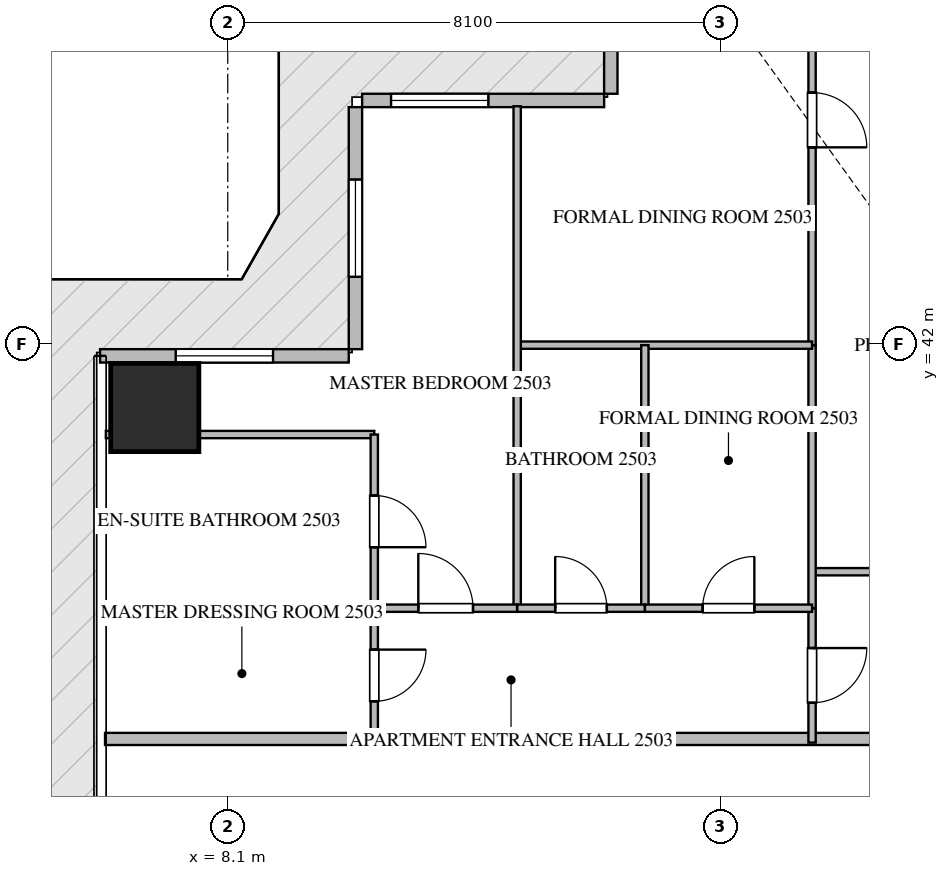
"""IFC4 building model, lengths in metres.
Left out: names, types, materials, properties, quantities, classifications, styles, units other than length and angle.
Written with IfcOpenShell. Run it as: python <this file> out.ifc"""

import sys

from ifc_helpers import new_model, si_unit, direction, frame, frame_2d, origin, origin_2d, place, context, subcontext, project, spatial, rectangle, extrude, source, transform, mapped, element, fill, save


model = new_model("IFC4")
c1 = context("Model", 3, precision=1e-05, world=origin(), true_north=direction((0.0, 1.0)))
c2 = subcontext(c1, "Body", "Model", "MODEL_VIEW")
j1 = project(units=[si_unit("LENGTHUNIT", "METRE"), si_unit("PLANEANGLEUNIT", "RADIAN")], contexts=[c1])
p1 = place(None, origin())
s1 = spatial("IfcSite", under=j1, at=p1, CompositionType="ELEMENT")
p2 = place(p1, origin())
s2 = spatial("IfcBuilding", under=s1, at=p2, CompositionType="ELEMENT")
p3 = place(p2, frame((0.0, 0.0, 101.7)))
s3 = spatial("IfcBuildingStorey", under=s2, at=p3, CompositionType="ELEMENT", Elevation=101.7)
m1 = source(origin(), c2, "Body", "SweptSolid", [
    extrude(rectangle(XDim=1.45, YDim=1.45, at=origin_2d()), origin(), (0.0, 0.0, 1.0), 3.75),
])
p4 = place(p3, frame((6.9, 40.95, -0.26), z_axis=(0.0, 0.0, 1.0), x_axis=(1.0, 0.0, 0.0)))
e1 = element("IfcColumn", 1, at=p4, inside=s3, PredefinedType="COLUMN", context=c2, shape_type="MappedRepresentation", body=[
    mapped(m1, transform((0.0, 0.0, 0.0), scale=1.0)),
])
p5 = place(p3, frame((14.4, 50.2, 0.0), z_axis=(0.0, 0.0, 1.0), x_axis=(0.0, -1.0, 0.0)))
e2 = element("IfcWall", 2, at=p5, inside=s3, PredefinedType="ELEMENTEDWALL", context=c2, shape_type="SweptSolid", body=[
    extrude(rectangle(XDim=4.09, YDim=0.22, at=frame_2d((2.045, 0.0))), origin(), (0.0, 0.0, 1.0), 3.475),
])
p6 = place(p5, frame((1.245, 0.0, 0.65)))
e3 = element("IfcOpeningElement", 3, at=p6, cuts=e2, PredefinedType="OPENING", context=c2, shape_type="SweptSolid", body=[
    extrude(rectangle(XDim=1.6, YDim=2.1, at=frame_2d((0.8, 1.05))), frame((0.0, 0.12, 0.0), z_axis=(0.0, -1.0, 0.0), x_axis=(1.0, 0.0, 0.0)), (0.0, 0.0, 1.0), 0.24),
])
p7 = place(p3, frame((14.29, 46.0, 0.0), z_axis=(0.0, 0.0, 1.0), x_axis=(-1.0, 0.0, 0.0)))
e4 = element("IfcWall", 4, at=p7, inside=s3, PredefinedType="ELEMENTEDWALL", context=c2, shape_type="SweptSolid", body=[
    extrude(rectangle(XDim=3.98, YDim=0.22, at=frame_2d((1.99, 0.0))), origin(), (0.0, 0.0, 1.0), 3.475),
])
p8 = place(p7, frame((1.904, 0.0, 0.65)))
e5 = element("IfcOpeningElement", 5, at=p8, cuts=e4, PredefinedType="OPENING", context=c2, shape_type="SweptSolid", body=[
    extrude(rectangle(XDim=1.6, YDim=2.1, at=frame_2d((0.8, 1.05))), frame((0.0, 0.12, 0.0), z_axis=(0.0, -1.0, 0.0), x_axis=(1.0, 0.0, 0.0)), (0.0, 0.0, 1.0), 0.24),
])
p9 = place(p3, frame((10.2, 45.89, 0.0), z_axis=(0.0, 0.0, 1.0), x_axis=(0.0, -1.0, 0.0)))
e6 = element("IfcWall", 6, at=p9, inside=s3, PredefinedType="ELEMENTEDWALL", context=c2, shape_type="SweptSolid", body=[
    extrude(rectangle(XDim=3.98, YDim=0.22, at=frame_2d((1.99, 0.0))), origin(), (0.0, 0.0, 1.0), 3.475),
])
p10 = place(p9, frame((1.19, 0.0, 0.65)))
e7 = element("IfcOpeningElement", 7, at=p10, cuts=e6, PredefinedType="OPENING", context=c2, shape_type="SweptSolid", body=[
    extrude(rectangle(XDim=1.6, YDim=2.1, at=frame_2d((0.8, 1.05))), frame((0.0, 0.12, 0.0), z_axis=(0.0, -1.0, 0.0), x_axis=(1.0, 0.0, 0.0)), (0.0, 0.0, 1.0), 0.24),
])
p11 = place(p3, frame((10.09, 41.8, 0.0), z_axis=(0.0, 0.0, 1.0), x_axis=(-1.0, 0.0, 0.0)))
e8 = element("IfcWall", 8, at=p11, inside=s3, PredefinedType="ELEMENTEDWALL", context=c2, shape_type="SweptSolid", body=[
    extrude(rectangle(XDim=4.09, YDim=0.22, at=frame_2d((2.045, 0.0))), origin(), (0.0, 0.0, 1.0), 3.475),
])
p12 = place(p11, frame((1.245, 0.0, 0.65)))
e9 = element("IfcOpeningElement", 9, at=p12, cuts=e8, PredefinedType="OPENING", context=c2, shape_type="SweptSolid", body=[
    extrude(rectangle(XDim=1.6, YDim=2.1, at=frame_2d((0.8, 1.05))), frame((0.0, 0.12, 0.0), z_axis=(0.0, -1.0, 0.0), x_axis=(1.0, 0.0, 0.0)), (0.0, 0.0, 1.0), 0.24),
])
p13 = place(p3, frame((6.082, 35.5, 0.0), z_axis=(0.0, 0.0, 1.0), x_axis=(1.0, 0.0, 0.0)))
e10 = element("IfcWall", 10, at=p13, inside=s3, PredefinedType="PARTITIONING", context=c2, shape_type="SweptSolid", body=[
    extrude(rectangle(XDim=15.318, YDim=0.2, at=frame_2d((7.659, 0.0))), origin(), (0.0, 0.0, 1.0), 3.49),
])
p14 = place(p3, frame((17.71, 38.25, 0.0), z_axis=(0.0, 0.0, 1.0), x_axis=(1.0, 0.0, 0.0)))
e11 = element("IfcWall", 11, at=p14, inside=s3, PredefinedType="PARTITIONING", context=c2, shape_type="SweptSolid", body=[
    extrude(rectangle(XDim=2.85, YDim=0.12, at=frame_2d((1.425, 0.0))), origin(), (0.0, 0.0, 1.0), 3.49),
])
p15 = place(p14, frame((1.0, 0.0, 0.0)))
e12 = element("IfcOpeningElement", 12, at=p15, cuts=e11, PredefinedType="OPENING", context=c2, shape_type="SweptSolid", body=[
    extrude(rectangle(XDim=0.85, YDim=2.1, at=frame_2d((0.425, 1.05))), frame((0.0, 0.07, 0.0), z_axis=(0.0, -1.0, 0.0), x_axis=(1.0, 0.0, 0.0)), (0.0, 0.0, 1.0), 0.14),
])
p16 = place(p3, frame((17.71, 37.65, 0.0), z_axis=(0.0, 0.0, 1.0), x_axis=(0.0, -1.0, 0.0)))
e13 = element("IfcWall", 13, at=p16, inside=s3, PredefinedType="PARTITIONING", context=c2, shape_type="SweptSolid", body=[
    extrude(rectangle(XDim=2.21, YDim=0.12, at=frame_2d((1.105, 0.0))), origin(), (0.0, 0.0, 1.0), 3.49),
])
p17 = place(p16, frame((0.655, 0.0, 0.0)))
e14 = element("IfcOpeningElement", 14, at=p17, cuts=e13, PredefinedType="OPENING", context=c2, shape_type="SweptSolid", body=[
    extrude(rectangle(XDim=0.9, YDim=2.1, at=frame_2d((0.45, 1.05))), frame((0.0, 0.07, 0.0), z_axis=(0.0, -1.0, 0.0), x_axis=(1.0, 0.0, 0.0)), (0.0, 0.0, 1.0), 0.14),
])
p18 = place(p3, frame((17.71, 50.105, 0.0), z_axis=(0.0, 0.0, 1.0), x_axis=(0.0, -1.0, 0.0)))
e15 = element("IfcWall", 15, at=p18, inside=s3, PredefinedType="PARTITIONING", context=c2, shape_type="SweptSolid", body=[
    extrude(rectangle(XDim=8.129, YDim=0.12, at=frame_2d((4.064, 0.0))), origin(), (0.0, 0.0, 1.0), 3.49),
])
p19 = place(p18, frame((3.976, 0.0, 0.0)))
e16 = element("IfcOpeningElement", 16, at=p19, cuts=e15, PredefinedType="OPENING", context=c2, shape_type="SweptSolid", body=[
    extrude(rectangle(XDim=0.9, YDim=2.1, at=frame_2d((0.45, 1.05))), frame((0.0, 0.07, 0.0), z_axis=(0.0, -1.0, 0.0), x_axis=(1.0, 0.0, 0.0)), (0.0, 0.0, 1.0), 0.14),
])
p20 = place(p3, frame((17.71, 41.974, 0.0), z_axis=(0.0, 0.0, 1.0), x_axis=(0.0, -1.0, 0.0)))
e17 = element("IfcWall", 17, at=p20, inside=s3, PredefinedType="PARTITIONING", context=c2, shape_type="SweptSolid", body=[
    extrude(rectangle(XDim=4.322, YDim=0.12, at=frame_2d((2.161, 0.0))), origin(), (0.0, 0.0, 1.0), 3.49),
])
p21 = place(p3, frame((12.86, 41.976, 0.0), z_axis=(0.0, 0.0, 1.0), x_axis=(1.0, 0.0, 0.0)))
e18 = element("IfcWall", 18, at=p21, inside=s3, PredefinedType="PARTITIONING", context=c2, shape_type="SweptSolid", body=[
    extrude(rectangle(XDim=4.85, YDim=0.12, at=frame_2d((2.425, 0.0))), origin(), (0.0, 0.0, 1.0), 3.49),
])
p22 = place(p3, frame((12.86, 45.905, 0.0), z_axis=(0.0, 0.0, 1.0), x_axis=(0.0, -1.0, 0.0)))
e19 = element("IfcWall", 19, at=p22, inside=s3, PredefinedType="PARTITIONING", context=c2, shape_type="SweptSolid", body=[
    extrude(rectangle(XDim=8.255, YDim=0.12, at=frame_2d((4.127, 0.0))), origin(), (0.0, 0.0, 1.0), 3.49),
])
p23 = place(p3, frame((14.96, 41.976, 0.0), z_axis=(0.0, 0.0, 1.0), x_axis=(0.0, -1.0, 0.0)))
e20 = element("IfcWall", 20, at=p23, inside=s3, PredefinedType="PARTITIONING", context=c2, shape_type="SweptSolid", body=[
    extrude(rectangle(XDim=4.326, YDim=0.12, at=frame_2d((2.163, 0.0))), origin(), (0.0, 0.0, 1.0), 3.49),
])
p24 = place(p3, frame((12.86, 37.65, 0.0), z_axis=(0.0, 0.0, 1.0), x_axis=(1.0, 0.0, 0.0)))
e21 = element("IfcWall", 21, at=p24, inside=s3, PredefinedType="PARTITIONING", context=c2, shape_type="SweptSolid", body=[
    extrude(rectangle(XDim=2.1, YDim=0.12, at=frame_2d((1.05, 0.0))), origin(), (0.0, 0.0, 1.0), 3.49),
])
p25 = place(p24, frame((0.625, 0.0, 0.0)))
e22 = element("IfcOpeningElement", 22, at=p25, cuts=e21, PredefinedType="OPENING", context=c2, shape_type="SweptSolid", body=[
    extrude(rectangle(XDim=0.85, YDim=2.1, at=frame_2d((0.425, 1.05))), frame((0.0, 0.07, 0.0), z_axis=(0.0, -1.0, 0.0), x_axis=(1.0, 0.0, 0.0)), (0.0, 0.0, 1.0), 0.14),
])
p26 = place(p3, frame((14.962, 37.65, 0.0), z_axis=(0.0, 0.0, 1.0), x_axis=(1.0, 0.0, 0.0)))
e23 = element("IfcWall", 23, at=p26, inside=s3, PredefinedType="PARTITIONING", context=c2, shape_type="SweptSolid", body=[
    extrude(rectangle(XDim=2.748, YDim=0.12, at=frame_2d((1.374, 0.0))), origin(), (0.0, 0.0, 1.0), 3.49),
])
p27 = place(p26, frame((0.949, 0.0, 0.0)))
e24 = element("IfcOpeningElement", 24, at=p27, cuts=e23, PredefinedType="OPENING", context=c2, shape_type="SweptSolid", body=[
    extrude(rectangle(XDim=0.85, YDim=2.1, at=frame_2d((0.425, 1.05))), frame((0.0, 0.07, 0.0), z_axis=(0.0, -1.0, 0.0), x_axis=(1.0, 0.0, 0.0)), (0.0, 0.0, 1.0), 0.14),
])
p28 = place(p3, frame((10.51, 37.65, 0.0), z_axis=(0.0, 0.0, 1.0), x_axis=(1.0, 0.0, 0.0)))
e25 = element("IfcWall", 25, at=p28, inside=s3, PredefinedType="PARTITIONING", context=c2, shape_type="SweptSolid", body=[
    extrude(rectangle(XDim=2.348, YDim=0.12, at=frame_2d((1.174, 0.0))), origin(), (0.0, 0.0, 1.0), 3.49),
])
p29 = place(p28, frame((0.724, 0.0, 0.0)))
e26 = element("IfcOpeningElement", 26, at=p29, cuts=e25, PredefinedType="OPENING", context=c2, shape_type="SweptSolid", body=[
    extrude(rectangle(XDim=0.9, YDim=2.1, at=frame_2d((0.45, 1.05))), frame((0.0, 0.07, 0.0), z_axis=(0.0, -1.0, 0.0), x_axis=(1.0, 0.0, 0.0)), (0.0, 0.0, 1.0), 0.14),
])
p30 = place(p3, frame((6.095, 40.506, 0.0), z_axis=(0.0, 0.0, 1.0), x_axis=(1.0, 0.0, 0.0)))
e27 = element("IfcWall", 27, at=p30, inside=s3, PredefinedType="PARTITIONING", context=c2, shape_type="SweptSolid", body=[
    extrude(rectangle(XDim=4.415, YDim=0.12, at=frame_2d((2.208, 0.0))), origin(), (0.0, 0.0, 1.0), 3.49),
])
p31 = place(p3, frame((6.095, 37.65, 0.0), z_axis=(0.0, 0.0, 1.0), x_axis=(1.0, 0.0, 0.0)))
e28 = element("IfcWall", 28, at=p31, inside=s3, PredefinedType="PARTITIONING", context=c2, shape_type="SweptSolid", body=[
    extrude(rectangle(XDim=4.413, YDim=0.12, at=frame_2d((2.207, 0.0))), origin(), (0.0, 0.0, 1.0), 3.49),
])
p32 = place(p3, frame((10.51, 40.506, 0.0), z_axis=(0.0, 0.0, 1.0), x_axis=(0.0, -1.0, 0.0)))
e29 = element("IfcWall", 29, at=p32, inside=s3, PredefinedType="PARTITIONING", context=c2, shape_type="SweptSolid", body=[
    extrude(rectangle(XDim=2.856, YDim=0.12, at=frame_2d((1.428, 0.0))), origin(), (0.0, 0.0, 1.0), 3.49),
])
p33 = place(p32, frame((1.003, 0.0, 0.0)))
e30 = element("IfcOpeningElement", 30, at=p33, cuts=e29, PredefinedType="OPENING", context=c2, shape_type="SweptSolid", body=[
    extrude(rectangle(XDim=0.85, YDim=2.1, at=frame_2d((0.425, 1.05))), frame((0.0, 0.07, 0.0), z_axis=(0.0, -1.0, 0.0), x_axis=(1.0, 0.0, 0.0)), (0.0, 0.0, 1.0), 0.14),
])
p34 = place(p3, frame((10.51, 37.648, 0.0), z_axis=(0.0, 0.0, 1.0), x_axis=(0.0, -1.0, 0.0)))
e31 = element("IfcWall", 31, at=p34, inside=s3, PredefinedType="PARTITIONING", context=c2, shape_type="SweptSolid", body=[
    extrude(rectangle(XDim=2.208, YDim=0.12, at=frame_2d((1.104, 0.0))), origin(), (0.0, 0.0, 1.0), 3.49),
])
p35 = place(p34, frame((0.679, 0.0, 0.0)))
e32 = element("IfcOpeningElement", 32, at=p35, cuts=e31, PredefinedType="OPENING", context=c2, shape_type="SweptSolid", body=[
    extrude(rectangle(XDim=0.85, YDim=2.1, at=frame_2d((0.425, 1.05))), frame((0.0, 0.07, 0.0), z_axis=(0.0, -1.0, 0.0), x_axis=(1.0, 0.0, 0.0)), (0.0, 0.0, 1.0), 0.14),
])
m2 = source(origin(), c2, "Body", "SweptSolid", [
    extrude(rectangle(XDim=1.6, YDim=2.1, at=frame_2d((0.8, 1.05))), frame((0.0, 0.03, 0.0), z_axis=(0.0, -1.0, 0.0), x_axis=(1.0, 0.0, 0.0)), (0.0, 0.0, 1.0), 0.06),
])
p36 = place(p8, origin())
e33 = element("IfcWindow", 33, at=p36, inside=s3, PartitioningType="SINGLE_PANEL", PredefinedType="WINDOW", context=c2, shape_type="MappedRepresentation", body=[
    mapped(m2, transform((0.0, 0.0, 0.0), scale=1.0)),
])
fill(e5, e33)
p37 = place(p10, origin())
e34 = element("IfcWindow", 34, at=p37, inside=s3, PartitioningType="SINGLE_PANEL", PredefinedType="WINDOW", context=c2, shape_type="MappedRepresentation", body=[
    mapped(m2, transform((0.0, 0.0, 0.0), scale=1.0)),
])
fill(e7, e34)
p38 = place(p12, origin())
e35 = element("IfcWindow", 35, at=p38, inside=s3, PartitioningType="SINGLE_PANEL", PredefinedType="WINDOW", context=c2, shape_type="MappedRepresentation", body=[
    mapped(m2, transform((0.0, 0.0, 0.0), scale=1.0)),
])
fill(e9, e35)
m3 = source(origin(), c2, "Body", "SweptSolid", [
    extrude(rectangle(XDim=0.9, YDim=2.1, at=frame_2d((0.45, 1.05))), frame((0.0, 0.025, 0.0), z_axis=(0.0, -1.0, 0.0), x_axis=(1.0, 0.0, 0.0)), (0.0, 0.0, 1.0), 0.05),
])
p39 = place(p17, origin())
e36 = element("IfcDoor", 36, at=p39, inside=s3, OperationType="SINGLE_SWING_LEFT", PredefinedType="DOOR", context=c2, shape_type="MappedRepresentation", body=[
    mapped(m3, transform((0.0, 0.0, 0.0), scale=1.0)),
])
fill(e14, e36)
p40 = place(p19, origin())
e37 = element("IfcDoor", 37, at=p40, inside=s3, OperationType="SINGLE_SWING_RIGHT", PredefinedType="DOOR", context=c2, shape_type="MappedRepresentation", body=[
    mapped(m3, transform((0.0, 0.0, 0.0), scale=1.0)),
])
fill(e16, e37)
m4 = source(origin(), c2, "Body", "SweptSolid", [
    extrude(rectangle(XDim=0.85, YDim=2.1, at=frame_2d((0.425, 1.05))), frame((0.0, 0.025, 0.0), z_axis=(0.0, -1.0, 0.0), x_axis=(1.0, 0.0, 0.0)), (0.0, 0.0, 1.0), 0.05),
])
p41 = place(p25, origin())
e38 = element("IfcDoor", 38, at=p41, inside=s3, OperationType="SINGLE_SWING_LEFT", PredefinedType="DOOR", context=c2, shape_type="MappedRepresentation", body=[
    mapped(m4, transform((0.0, 0.0, 0.0), scale=1.0)),
])
fill(e22, e38)
p42 = place(p27, origin())
e39 = element("IfcDoor", 39, at=p42, inside=s3, OperationType="SINGLE_SWING_RIGHT", PredefinedType="DOOR", context=c2, shape_type="MappedRepresentation", body=[
    mapped(m4, transform((0.0, 0.0, 0.0), scale=1.0)),
])
fill(e24, e39)
p43 = place(p29, origin())
e40 = element("IfcDoor", 40, at=p43, inside=s3, OperationType="SINGLE_SWING_LEFT", PredefinedType="DOOR", context=c2, shape_type="MappedRepresentation", body=[
    mapped(m3, transform((0.0, 0.0, 0.0), scale=1.0)),
])
fill(e26, e40)
p44 = place(p33, origin())
e41 = element("IfcDoor", 41, at=p44, inside=s3, OperationType="SINGLE_SWING_RIGHT", PredefinedType="DOOR", context=c2, shape_type="MappedRepresentation", body=[
    mapped(m4, transform((0.0, 0.0, 0.0), scale=1.0)),
])
fill(e30, e41)
p45 = place(p35, origin())
e42 = element("IfcDoor", 42, at=p45, inside=s3, OperationType="SINGLE_SWING_LEFT", PredefinedType="DOOR", context=c2, shape_type="MappedRepresentation", body=[
    mapped(m4, transform((0.0, 0.0, 0.0), scale=1.0)),
])
fill(e32, e42)
save(model, sys.argv[1])
